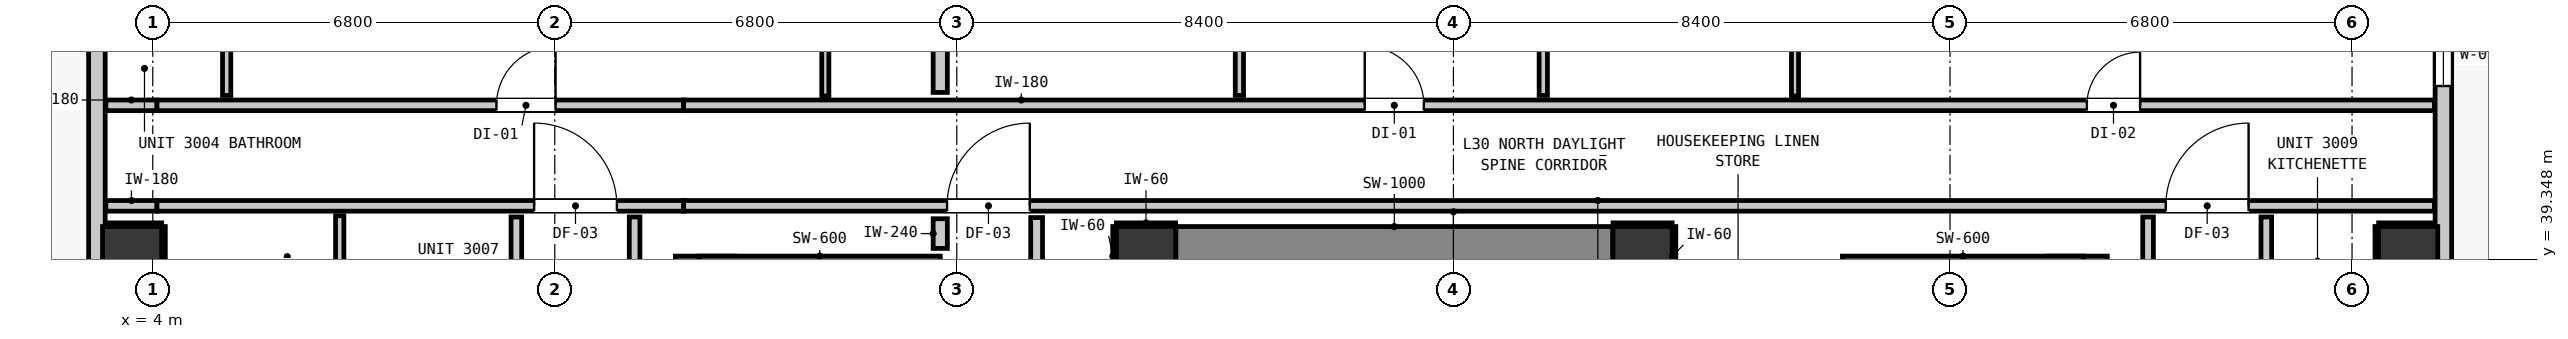
"""IFC4 building model, lengths in metres.
Left out: names, types, materials, properties, quantities, classifications, styles, units other than length and angle.
Written with IfcOpenShell. Run it as: python <this file> out.ifc"""

import sys

from ifc_helpers import new_model, si_unit, direction, frame, frame_2d, origin, origin_2d, place, context, subcontext, project, spatial, rectangle, extrude, element, fill, save


model = new_model("IFC4")
c1 = context("Model", 3, precision=1e-05, world=origin(), true_north=direction((0.0, 1.0)))
c2 = subcontext(c1, "Body", "Model", "MODEL_VIEW")
j1 = project(units=[si_unit("LENGTHUNIT", "METRE"), si_unit("PLANEANGLEUNIT", "RADIAN")], contexts=[c1])
p1 = place(None, origin())
s1 = spatial("IfcSite", under=j1, at=p1, CompositionType="ELEMENT")
p2 = place(p1, origin())
s2 = spatial("IfcBuilding", under=s1, at=p2, CompositionType="ELEMENT")
p3 = place(p2, frame((0.0, 0.0, 106.08)))
s3 = spatial("IfcBuildingStorey", under=s2, at=p3, CompositionType="ELEMENT", Elevation=106.08)
for number, where, z_axis, x_axis in (
    (1, (20.8, 39.4, 0.0), (0.0, 0.0, 1.0), (1.0, 0.0, 0.0)),
    (2, (29.2, 39.4, 0.0), (0.0, 0.0, 1.0), (1.0, 0.0, 0.0)),
):
    element("IfcColumn", number, at=place(p3, frame(where, z_axis=z_axis, x_axis=x_axis)), inside=s3, PredefinedType="COLUMN", context=c2, shape_type="SweptSolid", body=[
        extrude(rectangle(XDim=1.0, YDim=1.0, at=origin_2d()), origin(), (0.0, 0.0, 1.0), 3.32),
    ])
p4 = place(p3, frame((13.34, 31.205, 0.0), z_axis=(0.0, 0.0, 1.0), x_axis=(0.0, 1.0, 0.0)))
e3 = element("IfcWall", 3, at=p4, inside=s3, PredefinedType="SHEAR", context=c2, shape_type="SweptSolid", body=[
    extrude(rectangle(XDim=8.195, YDim=1.0, at=frame_2d((4.097, 0.0))), origin(), (0.0, 0.0, 1.0), 3.32),
])
p5 = place(p3, frame((13.24, 39.1, 0.0), z_axis=(0.0, 0.0, 1.0), x_axis=(1.0, 0.0, 0.0)))
e4 = element("IfcWall", 4, at=p5, inside=s3, PredefinedType="SHEAR", context=c2, shape_type="SweptSolid", body=[
    extrude(rectangle(XDim=4.08, YDim=0.6, at=frame_2d((2.04, 0.0))), origin(), (0.0, 0.0, 1.0), 3.32),
])
p6 = place(p3, frame((36.56, 31.205, 0.0), z_axis=(0.0, 0.0, 1.0), x_axis=(0.0, 1.0, 0.0)))
e5 = element("IfcWall", 5, at=p6, inside=s3, PredefinedType="SHEAR", context=c2, shape_type="SweptSolid", body=[
    extrude(rectangle(XDim=8.195, YDim=1.0, at=frame_2d((4.097, 0.0))), origin(), (0.0, 0.0, 1.0), 3.32),
])
p7 = place(p3, frame((32.58, 39.1, 0.0), z_axis=(0.0, 0.0, 1.0), x_axis=(1.0, 0.0, 0.0)))
e6 = element("IfcWall", 6, at=p7, inside=s3, PredefinedType="SHEAR", context=c2, shape_type="SweptSolid", body=[
    extrude(rectangle(XDim=4.08, YDim=0.6, at=frame_2d((2.04, 0.0))), origin(), (0.0, 0.0, 1.0), 3.32),
])
p8 = place(p3, frame((21.305, 39.4, 0.0), z_axis=(0.0, 0.0, 1.0), x_axis=(1.0, 0.0, 0.0)))
e7 = element("IfcWall", 7, at=p8, inside=s3, PredefinedType="SHEAR", context=c2, shape_type="SweptSolid", body=[
    extrude(rectangle(XDim=7.39, YDim=1.0, at=frame_2d((3.695, 0.0))), origin(), (0.0, 0.0, 1.0), 3.32),
])
for number, where, z_axis, x_axis in (
    (8, (3.65, 39.4, -0.2), (0.0, 0.0, 1.0), (1.0, 0.0, 0.0)),
    (9, (42.15, 39.4, -0.2), (0.0, 0.0, 1.0), (1.0, 0.0, 0.0)),
):
    element("IfcColumn", number, at=place(p3, frame(where, z_axis=z_axis, x_axis=x_axis)), inside=s3, PredefinedType="COLUMN", context=c2, shape_type="SweptSolid", body=[
        extrude(rectangle(XDim=1.0, YDim=1.0, at=origin_2d()), origin(), (0.0, 0.0, 1.0), 3.52),
    ])
p9 = place(p3, frame((3.055, 11.355, 0.0), z_axis=(0.0, 0.0, 1.0), x_axis=(0.0, 1.0, 0.0)))
e10 = element("IfcWall", 10, at=p9, inside=s3, PredefinedType="STANDARD", context=c2, shape_type="SweptSolid", body=[
    extrude(rectangle(XDim=32.29, YDim=0.28, at=frame_2d((16.145, 0.0))), origin(), (0.0, 0.0, 1.0), 3.08),
])
p10 = place(p9, frame((6.119, 0.0, 0.0)))
e11 = element("IfcOpeningElement", 11, at=p10, cuts=e10, PredefinedType="OPENING", context=c2, shape_type="SweptSolid", body=[
    extrude(rectangle(XDim=1.1, YDim=2.15, at=frame_2d((0.55, 1.075))), frame((0.0, 0.15, 0.0), z_axis=(0.0, -1.0, 0.0), x_axis=(1.0, 0.0, 0.0)), (0.0, 0.0, 1.0), 0.3),
])
p11 = place(p9, frame((0.545, 0.0, 0.85)))
e12 = element("IfcOpeningElement", 12, at=p11, cuts=e10, PredefinedType="OPENING", context=c2, shape_type="SweptSolid", body=[
    extrude(rectangle(XDim=1.05, YDim=1.65, at=frame_2d((0.525, 0.825))), frame((0.0, 0.15, 0.0), z_axis=(0.0, -1.0, 0.0), x_axis=(1.0, 0.0, 0.0)), (0.0, 0.0, 1.0), 0.3),
])
p12 = place(p9, frame((13.649, 0.0, 0.85)))
e13 = element("IfcOpeningElement", 13, at=p12, cuts=e10, PredefinedType="OPENING", context=c2, shape_type="SweptSolid", body=[
    extrude(rectangle(XDim=1.65, YDim=1.75, at=frame_2d((0.825, 0.875))), frame((0.0, 0.15, 0.0), z_axis=(0.0, -1.0, 0.0), x_axis=(1.0, 0.0, 0.0)), (0.0, 0.0, 1.0), 0.3),
])
p13 = place(p9, frame((16.887, 0.0, 0.85)))
e14 = element("IfcOpeningElement", 14, at=p13, cuts=e10, PredefinedType="OPENING", context=c2, shape_type="SweptSolid", body=[
    extrude(rectangle(XDim=1.65, YDim=1.75, at=frame_2d((0.825, 0.875))), frame((0.0, 0.15, 0.0), z_axis=(0.0, -1.0, 0.0), x_axis=(1.0, 0.0, 0.0)), (0.0, 0.0, 1.0), 0.3),
])
p14 = place(p9, frame((23.2, 0.0, 0.85)))
e15 = element("IfcOpeningElement", 15, at=p14, cuts=e10, PredefinedType="OPENING", context=c2, shape_type="SweptSolid", body=[
    extrude(rectangle(XDim=1.65, YDim=1.75, at=frame_2d((0.825, 0.875))), frame((0.0, 0.15, 0.0), z_axis=(0.0, -1.0, 0.0), x_axis=(1.0, 0.0, 0.0)), (0.0, 0.0, 1.0), 0.3),
])
p15 = place(p9, frame((26.312, 0.0, 0.85)))
e16 = element("IfcOpeningElement", 16, at=p15, cuts=e10, PredefinedType="OPENING", context=c2, shape_type="SweptSolid", body=[
    extrude(rectangle(XDim=1.05, YDim=1.65, at=frame_2d((0.525, 0.825))), frame((0.0, 0.15, 0.0), z_axis=(0.0, -1.0, 0.0), x_axis=(1.0, 0.0, 0.0)), (0.0, 0.0, 1.0), 0.3),
])
p16 = place(p3, frame((42.745, 43.645, 0.0), z_axis=(0.0, 0.0, 1.0), x_axis=(0.0, -1.0, 0.0)))
e17 = element("IfcWall", 17, at=p16, inside=s3, PredefinedType="STANDARD", context=c2, shape_type="SweptSolid", body=[
    extrude(rectangle(XDim=32.29, YDim=0.28, at=frame_2d((16.145, 0.0))), origin(), (0.0, 0.0, 1.0), 3.08),
])
p17 = place(p16, frame((6.821, 0.0, 0.0)))
e18 = element("IfcOpeningElement", 18, at=p17, cuts=e17, PredefinedType="OPENING", context=c2, shape_type="SweptSolid", body=[
    extrude(rectangle(XDim=1.1, YDim=2.15, at=frame_2d((0.55, 1.075))), frame((0.0, 0.15, 0.0), z_axis=(0.0, -1.0, 0.0), x_axis=(1.0, 0.0, 0.0)), (0.0, 0.0, 1.0), 0.3),
])
p18 = place(p16, frame((0.318, 0.0, 0.85)))
e19 = element("IfcOpeningElement", 19, at=p18, cuts=e17, PredefinedType="OPENING", context=c2, shape_type="SweptSolid", body=[
    extrude(rectangle(XDim=1.05, YDim=1.65, at=frame_2d((0.525, 0.825))), frame((0.0, 0.15, 0.0), z_axis=(0.0, -1.0, 0.0), x_axis=(1.0, 0.0, 0.0)), (0.0, 0.0, 1.0), 0.3),
])
p19 = place(p16, frame((16.895, 0.0, 0.85)))
e20 = element("IfcOpeningElement", 20, at=p19, cuts=e17, PredefinedType="OPENING", context=c2, shape_type="SweptSolid", body=[
    extrude(rectangle(XDim=1.65, YDim=1.75, at=frame_2d((0.825, 0.875))), frame((0.0, 0.15, 0.0), z_axis=(0.0, -1.0, 0.0), x_axis=(1.0, 0.0, 0.0)), (0.0, 0.0, 1.0), 0.3),
])
p20 = place(p16, frame((8.477, 0.0, 0.85)))
e21 = element("IfcOpeningElement", 21, at=p20, cuts=e17, PredefinedType="OPENING", context=c2, shape_type="SweptSolid", body=[
    extrude(rectangle(XDim=1.05, YDim=1.65, at=frame_2d((0.525, 0.825))), frame((0.0, 0.15, 0.0), z_axis=(0.0, -1.0, 0.0), x_axis=(1.0, 0.0, 0.0)), (0.0, 0.0, 1.0), 0.3),
])
p21 = place(p3, frame((3.207, 40.25, 0.0), z_axis=(0.0, 0.0, 1.0), x_axis=(1.0, 0.0, 0.0)))
e22 = element("IfcWall", 22, at=p21, inside=s3, PredefinedType="PARTITIONING", context=c2, shape_type="SweptSolid", body=[
    extrude(rectangle(XDim=0.864, YDim=0.18, at=frame_2d((0.432, 0.0))), origin(), (0.0, 0.0, 1.0), 3.08),
])
p22 = place(p3, frame((4.071, 40.25, 0.0), z_axis=(0.0, 0.0, 1.0), x_axis=(1.0, 0.0, 0.0)))
e23 = element("IfcWall", 23, at=p22, inside=s3, PredefinedType="PARTITIONING", context=c2, shape_type="SweptSolid", body=[
    extrude(rectangle(XDim=8.908, YDim=0.18, at=frame_2d((4.454, 0.0))), origin(), (0.0, 0.0, 1.0), 2.565),
])
p23 = place(p22, frame((6.379, 0.0, 0.0)))
e24 = element("IfcOpeningElement", 24, at=p23, cuts=e23, PredefinedType="OPENING", context=c2, shape_type="SweptSolid", body=[
    extrude(rectangle(XDim=1.4, YDim=2.15, at=frame_2d((0.7, 1.075))), frame((0.0, 0.1, 0.0), z_axis=(0.0, -1.0, 0.0), x_axis=(1.0, 0.0, 0.0)), (0.0, 0.0, 1.0), 0.2),
])
p24 = place(p3, frame((12.979, 40.25, 0.0), z_axis=(0.0, 0.0, 1.0), x_axis=(1.0, 0.0, 0.0)))
e25 = element("IfcWall", 25, at=p24, inside=s3, PredefinedType="PARTITIONING", context=c2, shape_type="SweptSolid", body=[
    extrude(rectangle(XDim=29.614, YDim=0.18, at=frame_2d((14.807, 0.0))), origin(), (0.0, 0.0, 1.0), 3.08),
])
p25 = place(p24, frame((4.456, 0.0, 0.0)))
e26 = element("IfcOpeningElement", 26, at=p25, cuts=e25, PredefinedType="OPENING", context=c2, shape_type="SweptSolid", body=[
    extrude(rectangle(XDim=1.4, YDim=2.15, at=frame_2d((0.7, 1.075))), frame((0.0, 0.1, 0.0), z_axis=(0.0, -1.0, 0.0), x_axis=(1.0, 0.0, 0.0)), (0.0, 0.0, 1.0), 0.2),
])
p26 = place(p24, frame((25.071, 0.0, 0.0)))
e27 = element("IfcOpeningElement", 27, at=p26, cuts=e25, PredefinedType="OPENING", context=c2, shape_type="SweptSolid", body=[
    extrude(rectangle(XDim=1.4, YDim=2.15, at=frame_2d((0.7, 1.075))), frame((0.0, 0.1, 0.0), z_axis=(0.0, -1.0, 0.0), x_axis=(1.0, 0.0, 0.0)), (0.0, 0.0, 1.0), 0.2),
])
p27 = place(p3, frame((3.207, 41.95, 0.0), z_axis=(0.0, 0.0, 1.0), x_axis=(1.0, 0.0, 0.0)))
e28 = element("IfcWall", 28, at=p27, inside=s3, PredefinedType="PARTITIONING", context=c2, shape_type="SweptSolid", body=[
    extrude(rectangle(XDim=0.864, YDim=0.18, at=frame_2d((0.432, 0.0))), origin(), (0.0, 0.0, 1.0), 3.08),
])
p28 = place(p3, frame((4.071, 41.95, 0.0), z_axis=(0.0, 0.0, 1.0), x_axis=(1.0, 0.0, 0.0)))
e29 = element("IfcWall", 29, at=p28, inside=s3, PredefinedType="PARTITIONING", context=c2, shape_type="SweptSolid", body=[
    extrude(rectangle(XDim=8.908, YDim=0.18, at=frame_2d((4.454, 0.0))), origin(), (0.0, 0.0, 1.0), 2.565),
])
p29 = place(p28, frame((5.742, 0.0, 0.0)))
e30 = element("IfcOpeningElement", 30, at=p29, cuts=e29, PredefinedType="OPENING", context=c2, shape_type="SweptSolid", body=[
    extrude(rectangle(XDim=1.0, YDim=2.15, at=frame_2d((0.5, 1.075))), frame((0.0, 0.1, 0.0), z_axis=(0.0, -1.0, 0.0), x_axis=(1.0, 0.0, 0.0)), (0.0, 0.0, 1.0), 0.2),
])
p30 = place(p3, frame((12.979, 41.95, 0.0), z_axis=(0.0, 0.0, 1.0), x_axis=(1.0, 0.0, 0.0)))
e31 = element("IfcWall", 31, at=p30, inside=s3, PredefinedType="PARTITIONING", context=c2, shape_type="SweptSolid", body=[
    extrude(rectangle(XDim=29.614, YDim=0.18, at=frame_2d((14.807, 0.0))), origin(), (0.0, 0.0, 1.0), 3.08),
])
p31 = place(p30, frame((11.521, 0.0, 0.0)))
e32 = element("IfcOpeningElement", 32, at=p31, cuts=e31, PredefinedType="OPENING", context=c2, shape_type="SweptSolid", body=[
    extrude(rectangle(XDim=1.0, YDim=2.15, at=frame_2d((0.5, 1.075))), frame((0.0, 0.1, 0.0), z_axis=(0.0, -1.0, 0.0), x_axis=(1.0, 0.0, 0.0)), (0.0, 0.0, 1.0), 0.2),
])
p32 = place(p30, frame((23.736, 0.0, 0.0)))
e33 = element("IfcOpeningElement", 33, at=p32, cuts=e31, PredefinedType="OPENING", context=c2, shape_type="SweptSolid", body=[
    extrude(rectangle(XDim=0.9, YDim=2.1, at=frame_2d((0.45, 1.05))), frame((0.0, 0.1, 0.0), z_axis=(0.0, -1.0, 0.0), x_axis=(1.0, 0.0, 0.0)), (0.0, 0.0, 1.0), 0.2),
])
p33 = place(p3, frame((17.32, 39.53, 0.0), z_axis=(0.0, 0.0, 1.0), x_axis=(0.0, 1.0, 0.0)))
e34 = element("IfcWall", 34, at=p33, inside=s3, PredefinedType="PARTITIONING", context=c2, shape_type="SweptSolid", body=[
    extrude(rectangle(XDim=0.502, YDim=0.24, at=frame_2d((0.251, 0.0))), origin(), (0.0, 0.0, 1.0), 3.08),
])
p34 = place(p3, frame((17.32, 42.168, 0.0), z_axis=(0.0, 0.0, 1.0), x_axis=(0.0, 1.0, 0.0)))
e35 = element("IfcWall", 35, at=p34, inside=s3, PredefinedType="PARTITIONING", context=c2, shape_type="SweptSolid", body=[
    extrude(rectangle(XDim=3.625, YDim=0.24, at=frame_2d((1.812, 0.0))), origin(), (0.0, 0.0, 1.0), 3.08),
])
p35 = place(p3, frame((18.95, 38.918, 0.0), z_axis=(0.0, 0.0, 1.0), x_axis=(0.0, 1.0, 0.0)))
e36 = element("IfcWall", 36, at=p35, inside=s3, PredefinedType="PARTITIONING", context=c2, shape_type="SweptSolid", body=[
    extrude(rectangle(XDim=1.134, YDim=0.2, at=frame_2d((0.567, 0.0))), origin(), (0.0, 0.0, 1.0), 3.08),
])
p36 = place(p3, frame((10.15, 37.553, 0.0), z_axis=(0.0, 0.0, 1.0), x_axis=(0.0, 1.0, 0.0)))
e37 = element("IfcWall", 37, at=p36, inside=s3, PredefinedType="PARTITIONING", context=c2, shape_type="SweptSolid", body=[
    extrude(rectangle(XDim=2.509, YDim=0.18, at=frame_2d((1.254, 0.0))), origin(), (0.0, 0.0, 1.0), 3.08),
])
for number, where, z_axis, x_axis in (
    (38, (12.15, 21.368, 0.0), (0.0, 0.0, 1.0), (0.0, 1.0, 0.0)),
    (39, (37.75, 21.368, 0.0), (0.0, 0.0, 1.0), (0.0, 1.0, 0.0)),
):
    element("IfcWall", number, at=place(p3, frame(where, z_axis=z_axis, x_axis=x_axis)), inside=s3, PredefinedType="PARTITIONING", context=c2, shape_type="SweptSolid", body=[
        extrude(rectangle(XDim=18.694, YDim=0.18, at=frame_2d((9.347, 0.0))), origin(), (0.0, 0.0, 1.0), 3.08),
    ])
p37 = place(p3, frame((39.75, 37.553, 0.0), z_axis=(0.0, 0.0, 1.0), x_axis=(0.0, 1.0, 0.0)))
e40 = element("IfcWall", 40, at=p37, inside=s3, PredefinedType="PARTITIONING", context=c2, shape_type="SweptSolid", body=[
    extrude(rectangle(XDim=2.509, YDim=0.18, at=frame_2d((1.254, 0.0))), origin(), (0.0, 0.0, 1.0), 3.08),
])
p38 = place(p3, frame((5.25, 42.118, 0.0), z_axis=(0.0, 0.0, 1.0), x_axis=(0.0, 1.0, 0.0)))
e41 = element("IfcWall", 41, at=p38, inside=s3, PredefinedType="PARTITIONING", context=c2, shape_type="SweptSolid", body=[
    extrude(rectangle(XDim=3.507, YDim=0.14, at=frame_2d((1.753, 0.0))), origin(), (0.0, 0.0, 1.0), 3.08),
])
p39 = place(p38, frame((1.327, 0.0, 0.0)))
e42 = element("IfcOpeningElement", 42, at=p39, cuts=e41, PredefinedType="OPENING", context=c2, shape_type="SweptSolid", body=[
    extrude(rectangle(XDim=0.86, YDim=2.02, at=frame_2d((0.43, 1.01))), frame((0.0, 0.08, 0.0), z_axis=(0.0, -1.0, 0.0), x_axis=(1.0, 0.0, 0.0)), (0.0, 0.0, 1.0), 0.16),
])
p40 = place(p3, frame((7.162, 37.533, 0.0), z_axis=(0.0, 0.0, 1.0), x_axis=(0.0, 1.0, 0.0)))
e43 = element("IfcWall", 43, at=p40, inside=s3, PredefinedType="PARTITIONING", context=c2, shape_type="SweptSolid", body=[
    extrude(rectangle(XDim=2.549, YDim=0.14, at=frame_2d((1.274, 0.0))), origin(), (0.0, 0.0, 1.0), 3.08),
])
p41 = place(p3, frame((22.38, 42.118, 0.0), z_axis=(0.0, 0.0, 1.0), x_axis=(0.0, 1.0, 0.0)))
e44 = element("IfcWall", 44, at=p41, inside=s3, PredefinedType="PARTITIONING", context=c2, shape_type="SweptSolid", body=[
    extrude(rectangle(XDim=3.675, YDim=0.14, at=frame_2d((1.837, 0.0))), origin(), (0.0, 0.0, 1.0), 3.08),
])
p42 = place(p41, frame((1.327, 0.0, 0.0)))
e45 = element("IfcOpeningElement", 45, at=p42, cuts=e44, PredefinedType="OPENING", context=c2, shape_type="SweptSolid", body=[
    extrude(rectangle(XDim=0.86, YDim=2.02, at=frame_2d((0.43, 1.01))), frame((0.0, 0.08, 0.0), z_axis=(0.0, -1.0, 0.0), x_axis=(1.0, 0.0, 0.0)), (0.0, 0.0, 1.0), 0.16),
])
p43 = place(p3, frame((27.52, 42.118, 0.0), z_axis=(0.0, 0.0, 1.0), x_axis=(0.0, 1.0, 0.0)))
e46 = element("IfcWall", 46, at=p43, inside=s3, PredefinedType="PARTITIONING", context=c2, shape_type="SweptSolid", body=[
    extrude(rectangle(XDim=3.675, YDim=0.14, at=frame_2d((1.837, 0.0))), origin(), (0.0, 0.0, 1.0), 3.08),
])
p44 = place(p43, frame((1.307, 0.0, 0.0)))
e47 = element("IfcOpeningElement", 47, at=p44, cuts=e46, PredefinedType="OPENING", context=c2, shape_type="SweptSolid", body=[
    extrude(rectangle(XDim=0.9, YDim=2.1, at=frame_2d((0.45, 1.05))), frame((0.0, 0.08, 0.0), z_axis=(0.0, -1.0, 0.0), x_axis=(1.0, 0.0, 0.0)), (0.0, 0.0, 1.0), 0.16),
])
p45 = place(p3, frame((15.376, 42.108, 0.0), z_axis=(0.0, 0.0, 1.0), x_axis=(0.0, 1.0, 0.0)))
e48 = element("IfcWall", 48, at=p45, inside=s3, PredefinedType="PARTITIONING", context=c2, shape_type="SweptSolid", body=[
    extrude(rectangle(XDim=3.685, YDim=0.12, at=frame_2d((1.843, 0.0))), origin(), (0.0, 0.0, 1.0), 3.08),
])
p46 = place(p45, frame((1.317, 0.0, 0.0)))
e49 = element("IfcOpeningElement", 49, at=p46, cuts=e48, PredefinedType="OPENING", context=c2, shape_type="SweptSolid", body=[
    extrude(rectangle(XDim=0.9, YDim=2.1, at=frame_2d((0.45, 1.05))), frame((0.0, 0.07, 0.0), z_axis=(0.0, -1.0, 0.0), x_axis=(1.0, 0.0, 0.0)), (0.0, 0.0, 1.0), 0.14),
])
p47 = place(p3, frame((31.778, 42.108, 0.0), z_axis=(0.0, 0.0, 1.0), x_axis=(0.0, 1.0, 0.0)))
e50 = element("IfcWall", 50, at=p47, inside=s3, PredefinedType="PARTITIONING", context=c2, shape_type="SweptSolid", body=[
    extrude(rectangle(XDim=3.685, YDim=0.12, at=frame_2d((1.843, 0.0))), origin(), (0.0, 0.0, 1.0), 3.08),
])
for number, where, z_axis, x_axis in (
    (51, (20.3, 39.932, 0.0), (0.0, 0.0, 1.0), (1.0, 0.0, 0.0)),
    (52, (20.268, 38.9, 0.0), (0.0, 0.0, 1.0), (0.0, 1.0, 0.0)),
    (53, (28.7, 39.932, 0.0), (0.0, 0.0, 1.0), (1.0, 0.0, 0.0)),
    (54, (29.732, 38.9, 0.0), (0.0, 0.0, 1.0), (0.0, 1.0, 0.0)),
):
    element("IfcWall", number, at=place(p3, frame(where, z_axis=z_axis, x_axis=x_axis)), inside=s3, PredefinedType="PARTITIONING", context=c2, shape_type="SweptSolid", body=[
        extrude(rectangle(XDim=1.0, YDim=0.06, at=frame_2d((0.5, 0.0))), origin(), (0.0, 0.0, 1.0), 1.45),
    ])
p48 = place(p3, frame((3.21, 39.932, 0.0), z_axis=(0.0, 0.0, 1.0), x_axis=(1.0, 0.0, 0.0)))
e55 = element("IfcWall", 55, at=p48, inside=s3, PredefinedType="PARTITIONING", context=c2, shape_type="SweptSolid", body=[
    extrude(rectangle(XDim=0.94, YDim=0.06, at=frame_2d((0.47, 0.0))), origin(), (0.0, 0.0, 1.0), 1.45),
])
p49 = place(p3, frame((4.182, 38.9, 0.0), z_axis=(0.0, 0.0, 1.0), x_axis=(0.0, 1.0, 0.0)))
e56 = element("IfcWall", 56, at=p49, inside=s3, PredefinedType="PARTITIONING", context=c2, shape_type="SweptSolid", body=[
    extrude(rectangle(XDim=1.0, YDim=0.06, at=frame_2d((0.5, 0.0))), origin(), (0.0, 0.0, 1.0), 1.45),
])
p50 = place(p3, frame((41.65, 39.932, 0.0), z_axis=(0.0, 0.0, 1.0), x_axis=(1.0, 0.0, 0.0)))
e57 = element("IfcWall", 57, at=p50, inside=s3, PredefinedType="PARTITIONING", context=c2, shape_type="SweptSolid", body=[
    extrude(rectangle(XDim=0.94, YDim=0.06, at=frame_2d((0.47, 0.0))), origin(), (0.0, 0.0, 1.0), 1.45),
])
p51 = place(p3, frame((41.618, 38.9, 0.0), z_axis=(0.0, 0.0, 1.0), x_axis=(0.0, 1.0, 0.0)))
e58 = element("IfcWall", 58, at=p51, inside=s3, PredefinedType="PARTITIONING", context=c2, shape_type="SweptSolid", body=[
    extrude(rectangle(XDim=1.0, YDim=0.06, at=frame_2d((0.5, 0.0))), origin(), (0.0, 0.0, 1.0), 1.45),
])
p52 = place(p18, origin())
e59 = element("IfcWindow", 59, at=p52, inside=s3, PartitioningType="SINGLE_PANEL", PredefinedType="WINDOW", context=c2, shape_type="SweptSolid", body=[
    extrude(rectangle(XDim=1.05, YDim=1.65, at=frame_2d((0.525, 0.825))), frame((0.0, 0.03, 0.0), z_axis=(0.0, -1.0, 0.0), x_axis=(1.0, 0.0, 0.0)), (0.0, 0.0, 1.0), 0.06),
])
fill(e19, e59)
p53 = place(p25, origin())
e60 = element("IfcDoor", 60, at=p53, inside=s3, OperationType="SINGLE_SWING_RIGHT", PredefinedType="DOOR", context=c2, shape_type="SweptSolid", body=[
    extrude(rectangle(XDim=1.4, YDim=2.15, at=frame_2d((0.7, 1.075))), frame((0.0, 0.025, 0.0), z_axis=(0.0, -1.0, 0.0), x_axis=(1.0, 0.0, 0.0)), (0.0, 0.0, 1.0), 0.05),
])
fill(e26, e60)
p54 = place(p23, origin())
e61 = element("IfcDoor", 61, at=p54, inside=s3, OperationType="SINGLE_SWING_LEFT", PredefinedType="DOOR", context=c2, shape_type="SweptSolid", body=[
    extrude(rectangle(XDim=1.4, YDim=2.15, at=frame_2d((0.7, 1.075))), frame((0.0, 0.025, 0.0), z_axis=(0.0, -1.0, 0.0), x_axis=(1.0, 0.0, 0.0)), (0.0, 0.0, 1.0), 0.05),
])
fill(e24, e61)
p55 = place(p26, origin())
e62 = element("IfcDoor", 62, at=p55, inside=s3, OperationType="SINGLE_SWING_RIGHT", PredefinedType="DOOR", context=c2, shape_type="SweptSolid", body=[
    extrude(rectangle(XDim=1.4, YDim=2.15, at=frame_2d((0.7, 1.075))), frame((0.0, 0.025, 0.0), z_axis=(0.0, -1.0, 0.0), x_axis=(1.0, 0.0, 0.0)), (0.0, 0.0, 1.0), 0.05),
])
fill(e27, e62)
p56 = place(p29, origin())
e63 = element("IfcDoor", 63, at=p56, inside=s3, OperationType="SINGLE_SWING_RIGHT", PredefinedType="DOOR", context=c2, shape_type="SweptSolid", body=[
    extrude(rectangle(XDim=1.0, YDim=2.15, at=frame_2d((0.5, 1.075))), frame((0.0, 0.025, 0.0), z_axis=(0.0, -1.0, 0.0), x_axis=(1.0, 0.0, 0.0)), (0.0, 0.0, 1.0), 0.05),
])
fill(e30, e63)
p57 = place(p31, origin())
e64 = element("IfcDoor", 64, at=p57, inside=s3, OperationType="SINGLE_SWING_LEFT", PredefinedType="DOOR", context=c2, shape_type="SweptSolid", body=[
    extrude(rectangle(XDim=1.0, YDim=2.15, at=frame_2d((0.5, 1.075))), frame((0.0, 0.025, 0.0), z_axis=(0.0, -1.0, 0.0), x_axis=(1.0, 0.0, 0.0)), (0.0, 0.0, 1.0), 0.05),
])
fill(e32, e64)
p58 = place(p32, origin())
e65 = element("IfcDoor", 65, at=p58, inside=s3, OperationType="SINGLE_SWING_RIGHT", PredefinedType="DOOR", context=c2, shape_type="SweptSolid", body=[
    extrude(rectangle(XDim=0.9, YDim=2.1, at=frame_2d((0.45, 1.05))), frame((0.0, 0.025, 0.0), z_axis=(0.0, -1.0, 0.0), x_axis=(1.0, 0.0, 0.0)), (0.0, 0.0, 1.0), 0.05),
])
fill(e33, e65)
save(model, sys.argv[1])
